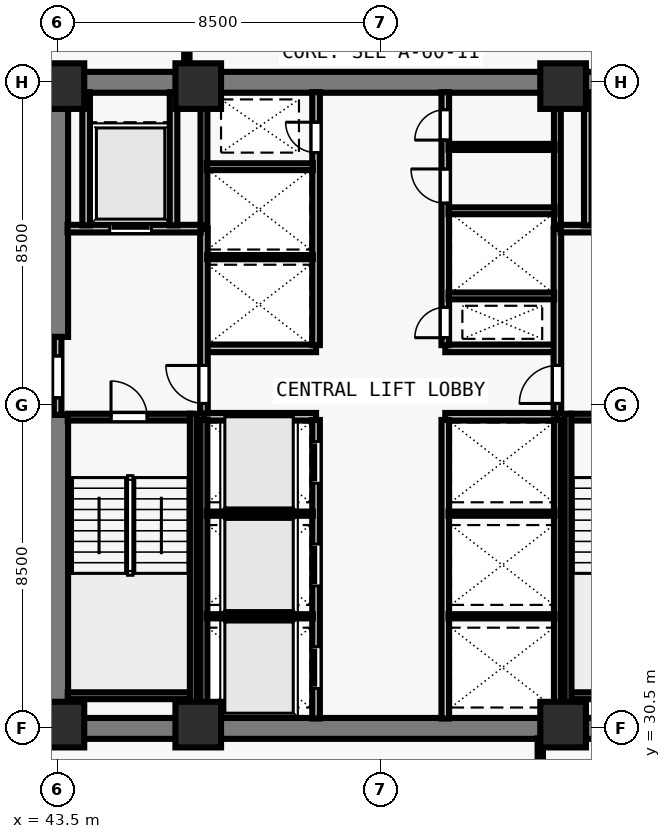
"""IFC4 building model, lengths in metres.
Left out: names, types, materials, properties, quantities, classifications, styles, units other than length and angle.
Written with IfcOpenShell. Run it as: python <this file> out.ifc"""

import sys

from ifc_helpers import new_model, si_unit, direction, frame, frame_2d, origin, origin_2d, place, context, subcontext, project, spatial, rectangle, extrude, element, fill, save


model = new_model("IFC4")
c1 = context("Model", 3, precision=1e-05, world=origin(), true_north=direction((0.0, 1.0)))
c2 = subcontext(c1, "Body", "Model", "MODEL_VIEW")
j1 = project(units=[si_unit("LENGTHUNIT", "METRE"), si_unit("PLANEANGLEUNIT", "RADIAN")], contexts=[c1])
p1 = place(None, origin())
s1 = spatial("IfcSite", under=j1, at=p1, CompositionType="ELEMENT")
p2 = place(p1, origin())
s2 = spatial("IfcBuilding", under=s1, at=p2, CompositionType="ELEMENT")
p3 = place(p2, frame((0.0, 0.0, 34.0)))
s3 = spatial("IfcBuildingStorey", under=s2, at=p3, CompositionType="ELEMENT", Elevation=34.0)
for number, where, z_axis, x_axis in (
    (1, (43.6, 30.6, 0.0), (0.0, 0.0, 1.0), (1.0, 0.0, 0.0)),
    (2, (47.2, 30.6, 0.0), (0.0, 0.0, 1.0), (1.0, 0.0, 0.0)),
    (3, (56.8, 30.6, 0.0), (0.0, 0.0, 1.0), (1.0, 0.0, 0.0)),
    (4, (43.6, 47.4, 0.0), (0.0, 0.0, 1.0), (1.0, 0.0, 0.0)),
    (5, (47.2, 47.4, 0.0), (0.0, 0.0, 1.0), (1.0, 0.0, 0.0)),
    (6, (56.8, 47.4, 0.0), (0.0, 0.0, 1.0), (1.0, 0.0, 0.0)),
):
    element("IfcColumn", number, at=place(p3, frame(where, z_axis=z_axis, x_axis=x_axis)), inside=s3, PredefinedType="COLUMN", context=c2, shape_type="SweptSolid", body=[
        extrude(rectangle(XDim=1.2, YDim=1.2, at=origin_2d()), origin(), (0.0, 0.0, 1.0), 3.5),
    ])
for number, where, z_axis, x_axis in (
    (7, (43.225, 30.5, 0.0), (0.0, 0.0, 1.0), (1.0, 0.0, 0.0)),
    (8, (43.225, 47.5, 0.0), (0.0, 0.0, 1.0), (1.0, 0.0, 0.0)),
):
    element("IfcWall", number, at=place(p3, frame(where, z_axis=z_axis, x_axis=x_axis)), inside=s3, PredefinedType="SHEAR", context=c2, shape_type="SweptSolid", body=[
        extrude(rectangle(XDim=17.55, YDim=0.55, at=frame_2d((8.775, 0.0))), origin(), (0.0, 0.0, 1.0), 3.28),
    ])
p4 = place(p3, frame((43.5, 30.765, 0.0), z_axis=(0.0, 0.0, 1.0), x_axis=(0.0, 1.0, 0.0)))
e9 = element("IfcWall", 9, at=p4, inside=s3, PredefinedType="SHEAR", context=c2, shape_type="SweptSolid", body=[
    extrude(rectangle(XDim=7.985, YDim=0.55, at=frame_2d((3.993, 0.0))), origin(), (0.0, 0.0, 1.0), 3.28),
])
p5 = place(p3, frame((43.5, 40.8, 0.0), z_axis=(0.0, 0.0, 1.0), x_axis=(0.0, 1.0, 0.0)))
e10 = element("IfcWall", 10, at=p5, inside=s3, PredefinedType="SHEAR", context=c2, shape_type="SweptSolid", body=[
    extrude(rectangle(XDim=6.435, YDim=0.55, at=frame_2d((3.218, 0.0))), origin(), (0.0, 0.0, 1.0), 3.28),
])
for number, where, z_axis, x_axis in (
    (11, (47.35, 38.7, 0.0), (0.0, 0.0, 1.0), (1.0, 0.0, 0.0)),
    (12, (47.35, 40.5, 0.0), (0.0, 0.0, 1.0), (1.0, 0.0, 0.0)),
    (13, (53.7, 38.7, 0.0), (0.0, 0.0, 1.0), (1.0, 0.0, 0.0)),
    (14, (53.7, 40.5, 0.0), (0.0, 0.0, 1.0), (1.0, 0.0, 0.0)),
):
    element("IfcWall", number, at=place(p3, frame(where, z_axis=z_axis, x_axis=x_axis)), inside=s3, PredefinedType="SOLIDWALL", context=c2, shape_type="SweptSolid", body=[
        extrude(rectangle(XDim=2.95, YDim=0.2, at=frame_2d((1.475, 0.0))), origin(), (0.0, 0.0, 1.0), 3.28),
    ])
p6 = place(p3, frame((50.3, 30.76, 0.0), z_axis=(0.0, 0.0, 1.0), x_axis=(0.0, 1.0, 0.0)))
e15 = element("IfcWall", 15, at=p6, inside=s3, PredefinedType="SOLIDWALL", context=c2, shape_type="SweptSolid", body=[
    extrude(rectangle(XDim=7.855, YDim=0.2, at=frame_2d((3.927, 0.0))), origin(), (0.0, 0.0, 1.0), 3.28),
])
p7 = place(p6, frame((0.79, 0.0, 0.0)))
e16 = element("IfcOpeningElement", 16, at=p7, cuts=e15, PredefinedType="OPENING", context=c2, shape_type="SweptSolid", body=[
    extrude(rectangle(XDim=1.1, YDim=2.2, at=frame_2d((0.55, 1.1))), frame((0.0, 0.11, 0.0), z_axis=(0.0, -1.0, 0.0), x_axis=(1.0, 0.0, 0.0)), (0.0, 0.0, 1.0), 0.22),
])
p8 = place(p6, frame((3.49, 0.0, 0.0)))
e17 = element("IfcOpeningElement", 17, at=p8, cuts=e15, PredefinedType="OPENING", context=c2, shape_type="SweptSolid", body=[
    extrude(rectangle(XDim=1.1, YDim=2.2, at=frame_2d((0.55, 1.1))), frame((0.0, 0.11, 0.0), z_axis=(0.0, -1.0, 0.0), x_axis=(1.0, 0.0, 0.0)), (0.0, 0.0, 1.0), 0.22),
])
p9 = place(p6, frame((6.19, 0.0, 0.0)))
e18 = element("IfcOpeningElement", 18, at=p9, cuts=e15, PredefinedType="OPENING", context=c2, shape_type="SweptSolid", body=[
    extrude(rectangle(XDim=1.1, YDim=2.2, at=frame_2d((0.55, 1.1))), frame((0.0, 0.11, 0.0), z_axis=(0.0, -1.0, 0.0), x_axis=(1.0, 0.0, 0.0)), (0.0, 0.0, 1.0), 0.22),
])
p10 = place(p3, frame((53.7, 30.76, 0.0), z_axis=(0.0, 0.0, 1.0), x_axis=(0.0, 1.0, 0.0)))
e19 = element("IfcWall", 19, at=p10, inside=s3, PredefinedType="SOLIDWALL", context=c2, shape_type="SweptSolid", body=[
    extrude(rectangle(XDim=7.855, YDim=0.2, at=frame_2d((3.927, 0.0))), origin(), (0.0, 0.0, 1.0), 3.28),
])
p11 = place(p3, frame((50.3, 40.585, 0.0), z_axis=(0.0, 0.0, 1.0), x_axis=(0.0, 1.0, 0.0)))
e20 = element("IfcWall", 20, at=p11, inside=s3, PredefinedType="SOLIDWALL", context=c2, shape_type="SweptSolid", body=[
    extrude(rectangle(XDim=6.655, YDim=0.2, at=frame_2d((3.328, 0.0))), origin(), (0.0, 0.0, 1.0), 3.28),
])
p12 = place(p11, frame((5.065, 0.0, 0.0)))
e21 = element("IfcOpeningElement", 21, at=p12, cuts=e20, PredefinedType="OPENING", context=c2, shape_type="SweptSolid", body=[
    extrude(rectangle(XDim=0.8, YDim=2.08, at=frame_2d((0.4, 1.04))), frame((0.0, 0.11, 0.0), z_axis=(0.0, -1.0, 0.0), x_axis=(1.0, 0.0, 0.0)), (0.0, 0.0, 1.0), 0.22),
])
p13 = place(p3, frame((53.7, 40.585, 0.0), z_axis=(0.0, 0.0, 1.0), x_axis=(0.0, 1.0, 0.0)))
e22 = element("IfcWall", 22, at=p13, inside=s3, PredefinedType="SOLIDWALL", context=c2, shape_type="SweptSolid", body=[
    extrude(rectangle(XDim=6.655, YDim=0.2, at=frame_2d((3.328, 0.0))), origin(), (0.0, 0.0, 1.0), 3.28),
])
p14 = place(p13, frame((0.195, 0.0, 0.0)))
e23 = element("IfcOpeningElement", 23, at=p14, cuts=e22, PredefinedType="OPENING", context=c2, shape_type="SweptSolid", body=[
    extrude(rectangle(XDim=0.8, YDim=2.08, at=frame_2d((0.4, 1.04))), frame((0.0, 0.11, 0.0), z_axis=(0.0, -1.0, 0.0), x_axis=(1.0, 0.0, 0.0)), (0.0, 0.0, 1.0), 0.22),
])
p15 = place(p13, frame((3.735, 0.0, 0.0)))
e24 = element("IfcOpeningElement", 24, at=p15, cuts=e22, PredefinedType="OPENING", context=c2, shape_type="SweptSolid", body=[
    extrude(rectangle(XDim=0.9, YDim=2.12, at=frame_2d((0.45, 1.06))), frame((0.0, 0.11, 0.0), z_axis=(0.0, -1.0, 0.0), x_axis=(1.0, 0.0, 0.0)), (0.0, 0.0, 1.0), 0.22),
])
p16 = place(p13, frame((5.395, 0.0, 0.0)))
e25 = element("IfcOpeningElement", 25, at=p16, cuts=e22, PredefinedType="OPENING", context=c2, shape_type="SweptSolid", body=[
    extrude(rectangle(XDim=0.8, YDim=2.1, at=frame_2d((0.4, 1.05))), frame((0.0, 0.11, 0.0), z_axis=(0.0, -1.0, 0.0), x_axis=(1.0, 0.0, 0.0)), (0.0, 0.0, 1.0), 0.22),
])
p17 = place(p3, frame((43.5, 38.75, 0.0), z_axis=(0.0, 0.0, 1.0), x_axis=(0.0, 1.0, 0.0)))
e26 = element("IfcWall", 26, at=p17, inside=s3, PredefinedType="SOLIDWALL", context=c2, shape_type="SweptSolid", body=[
    extrude(rectangle(XDim=2.05, YDim=0.2, at=frame_2d((1.025, 0.0))), origin(), (0.0, 0.0, 1.0), 3.28),
])
p18 = place(p17, frame((0.45, 0.0, 0.0)))
e27 = element("IfcOpeningElement", 27, at=p18, cuts=e26, PredefinedType="OPENING", context=c2, shape_type="SweptSolid", body=[
    extrude(rectangle(XDim=1.1, YDim=2.15, at=frame_2d((0.55, 1.075))), frame((0.0, 0.11, 0.0), z_axis=(0.0, -1.0, 0.0), x_axis=(1.0, 0.0, 0.0)), (0.0, 0.0, 1.0), 0.22),
])
p19 = place(p3, frame((47.35, 38.785, 0.0), z_axis=(0.0, 0.0, 1.0), x_axis=(0.0, 1.0, 0.0)))
e28 = element("IfcWall", 28, at=p19, inside=s3, PredefinedType="SOLIDWALL", context=c2, shape_type="SweptSolid", body=[
    extrude(rectangle(XDim=4.865, YDim=0.2, at=frame_2d((2.433, 0.0))), origin(), (0.0, 0.0, 1.0), 3.28),
])
p20 = place(p19, frame((0.265, 0.0, 0.0)))
e29 = element("IfcOpeningElement", 29, at=p20, cuts=e28, PredefinedType="OPENING", context=c2, shape_type="SweptSolid", body=[
    extrude(rectangle(XDim=1.0, YDim=2.15, at=frame_2d((0.5, 1.075))), frame((0.0, 0.11, 0.0), z_axis=(0.0, -1.0, 0.0), x_axis=(1.0, 0.0, 0.0)), (0.0, 0.0, 1.0), 0.22),
])
p21 = place(p3, frame((43.76, 43.65, 0.0), z_axis=(0.0, 0.0, 1.0), x_axis=(1.0, 0.0, 0.0)))
e30 = element("IfcWall", 30, at=p21, inside=s3, PredefinedType="SOLIDWALL", context=c2, shape_type="SweptSolid", body=[
    extrude(rectangle(XDim=3.505, YDim=0.2, at=frame_2d((1.752, 0.0))), origin(), (0.0, 0.0, 1.0), 3.28),
])
p22 = place(p21, frame((1.11, 0.0, 0.0)))
e31 = element("IfcOpeningElement", 31, at=p22, cuts=e30, PredefinedType="OPENING", context=c2, shape_type="SweptSolid", body=[
    extrude(rectangle(XDim=1.1, YDim=2.2, at=frame_2d((0.55, 1.1))), frame((0.0, 0.11, 0.0), z_axis=(0.0, -1.0, 0.0), x_axis=(1.0, 0.0, 0.0)), (0.0, 0.0, 1.0), 0.22),
])
for number, where, z_axis, x_axis in (
    (32, (46.55, 43.735, 0.0), (0.0, 0.0, 1.0), (0.0, 1.0, 0.0)),
    (33, (44.25, 43.735, 0.0), (0.0, 0.0, 1.0), (0.0, 1.0, 0.0)),
):
    element("IfcWall", number, at=place(p3, frame(where, z_axis=z_axis, x_axis=x_axis)), inside=s3, PredefinedType="SOLIDWALL", context=c2, shape_type="SweptSolid", body=[
        extrude(rectangle(XDim=3.505, YDim=0.2, at=frame_2d((1.752, 0.0))), origin(), (0.0, 0.0, 1.0), 3.28),
    ])
p23 = place(p3, frame((56.65, 38.785, 0.0), z_axis=(0.0, 0.0, 1.0), x_axis=(0.0, 1.0, 0.0)))
e34 = element("IfcWall", 34, at=p23, inside=s3, PredefinedType="SOLIDWALL", context=c2, shape_type="SweptSolid", body=[
    extrude(rectangle(XDim=4.865, YDim=0.2, at=frame_2d((2.433, 0.0))), origin(), (0.0, 0.0, 1.0), 3.28),
])
p24 = place(p23, frame((0.265, 0.0, 0.0)))
e35 = element("IfcOpeningElement", 35, at=p24, cuts=e34, PredefinedType="OPENING", context=c2, shape_type="SweptSolid", body=[
    extrude(rectangle(XDim=1.0, YDim=2.15, at=frame_2d((0.5, 1.075))), frame((0.0, 0.11, 0.0), z_axis=(0.0, -1.0, 0.0), x_axis=(1.0, 0.0, 0.0)), (0.0, 0.0, 1.0), 0.22),
])
p25 = place(p3, frame((56.735, 43.65, 0.0), z_axis=(0.0, 0.0, 1.0), x_axis=(1.0, 0.0, 0.0)))
e36 = element("IfcWall", 36, at=p25, inside=s3, PredefinedType="SOLIDWALL", context=c2, shape_type="SweptSolid", body=[
    extrude(rectangle(XDim=3.505, YDim=0.2, at=frame_2d((1.752, 0.0))), origin(), (0.0, 0.0, 1.0), 3.28),
])
p26 = place(p25, frame((1.295, 0.0, 0.0)))
e37 = element("IfcOpeningElement", 37, at=p26, cuts=e36, PredefinedType="OPENING", context=c2, shape_type="SweptSolid", body=[
    extrude(rectangle(XDim=1.1, YDim=2.2, at=frame_2d((0.55, 1.1))), frame((0.0, 0.11, 0.0), z_axis=(0.0, -1.0, 0.0), x_axis=(1.0, 0.0, 0.0)), (0.0, 0.0, 1.0), 0.22),
])
p27 = place(p3, frame((57.45, 43.735, 0.0), z_axis=(0.0, 0.0, 1.0), x_axis=(0.0, 1.0, 0.0)))
e38 = element("IfcWall", 38, at=p27, inside=s3, PredefinedType="SOLIDWALL", context=c2, shape_type="SweptSolid", body=[
    extrude(rectangle(XDim=3.505, YDim=0.2, at=frame_2d((1.752, 0.0))), origin(), (0.0, 0.0, 1.0), 3.28),
])
p28 = place(p3, frame((47.35, 30.76, 0.0), z_axis=(0.0, 0.0, 1.0), x_axis=(0.0, 1.0, 0.0)))
e39 = element("IfcWall", 39, at=p28, inside=s3, PredefinedType="SOLIDWALL", context=c2, shape_type="SweptSolid", body=[
    extrude(rectangle(XDim=7.855, YDim=0.18, at=frame_2d((3.927, 0.0))), origin(), (0.0, 0.0, 1.0), 3.28),
])
for number, where, z_axis, x_axis in (
    (40, (47.425, 33.45, 0.0), (0.0, 0.0, 1.0), (1.0, 0.0, 0.0)),
    (41, (47.425, 36.15, 0.0), (0.0, 0.0, 1.0), (1.0, 0.0, 0.0)),
):
    element("IfcWall", number, at=place(p3, frame(where, z_axis=z_axis, x_axis=x_axis)), inside=s3, PredefinedType="PARTITIONING", context=c2, shape_type="SweptSolid", body=[
        extrude(rectangle(XDim=2.79, YDim=0.11, at=frame_2d((1.395, 0.0))), origin(), (0.0, 0.0, 1.0), 3.28),
    ])
p29 = place(p3, frame((56.65, 30.76, 0.0), z_axis=(0.0, 0.0, 1.0), x_axis=(0.0, 1.0, 0.0)))
e42 = element("IfcWall", 42, at=p29, inside=s3, PredefinedType="SOLIDWALL", context=c2, shape_type="SweptSolid", body=[
    extrude(rectangle(XDim=7.855, YDim=0.18, at=frame_2d((3.927, 0.0))), origin(), (0.0, 0.0, 1.0), 3.28),
])
for number, where, z_axis, x_axis in (
    (43, (53.785, 33.45, 0.0), (0.0, 0.0, 1.0), (1.0, 0.0, 0.0)),
    (44, (53.785, 36.15, 0.0), (0.0, 0.0, 1.0), (1.0, 0.0, 0.0)),
):
    element("IfcWall", number, at=place(p3, frame(where, z_axis=z_axis, x_axis=x_axis)), inside=s3, PredefinedType="PARTITIONING", context=c2, shape_type="SweptSolid", body=[
        extrude(rectangle(XDim=2.79, YDim=0.11, at=frame_2d((1.395, 0.0))), origin(), (0.0, 0.0, 1.0), 3.28),
    ])
p30 = place(p3, frame((47.35, 43.735, 0.0), z_axis=(0.0, 0.0, 1.0), x_axis=(0.0, 1.0, 0.0)))
e45 = element("IfcWall", 45, at=p30, inside=s3, PredefinedType="SOLIDWALL", context=c2, shape_type="SweptSolid", body=[
    extrude(rectangle(XDim=3.505, YDim=0.18, at=frame_2d((1.752, 0.0))), origin(), (0.0, 0.0, 1.0), 3.28),
])
p31 = place(p3, frame((47.435, 42.9, 0.0), z_axis=(0.0, 0.0, 1.0), x_axis=(1.0, 0.0, 0.0)))
e46 = element("IfcWall", 46, at=p31, inside=s3, PredefinedType="PARTITIONING", context=c2, shape_type="SweptSolid", body=[
    extrude(rectangle(XDim=2.78, YDim=0.11, at=frame_2d((1.39, 0.0))), origin(), (0.0, 0.0, 1.0), 3.28),
])
p32 = place(p3, frame((47.425, 45.28, 0.0), z_axis=(0.0, 0.0, 1.0), x_axis=(1.0, 0.0, 0.0)))
e47 = element("IfcWall", 47, at=p32, inside=s3, PredefinedType="SOLIDWALL", context=c2, shape_type="SweptSolid", body=[
    extrude(rectangle(XDim=2.79, YDim=0.18, at=frame_2d((1.395, 0.0))), origin(), (0.0, 0.0, 1.0), 3.28),
])
p33 = place(p3, frame((56.65, 43.735, 0.0), z_axis=(0.0, 0.0, 1.0), x_axis=(0.0, 1.0, 0.0)))
e48 = element("IfcWall", 48, at=p33, inside=s3, PredefinedType="SOLIDWALL", context=c2, shape_type="SweptSolid", body=[
    extrude(rectangle(XDim=3.505, YDim=0.18, at=frame_2d((1.752, 0.0))), origin(), (0.0, 0.0, 1.0), 3.28),
])
p34 = place(p3, frame((53.785, 41.88, 0.0), z_axis=(0.0, 0.0, 1.0), x_axis=(1.0, 0.0, 0.0)))
e49 = element("IfcWall", 49, at=p34, inside=s3, PredefinedType="SOLIDWALL", context=c2, shape_type="SweptSolid", body=[
    extrude(rectangle(XDim=2.78, YDim=0.18, at=frame_2d((1.39, 0.0))), origin(), (0.0, 0.0, 1.0), 3.28),
])
p35 = place(p3, frame((53.785, 44.12, 0.0), z_axis=(0.0, 0.0, 1.0), x_axis=(1.0, 0.0, 0.0)))
e50 = element("IfcWall", 50, at=p35, inside=s3, PredefinedType="SOLIDWALL", context=c2, shape_type="SweptSolid", body=[
    extrude(rectangle(XDim=2.79, YDim=0.18, at=frame_2d((1.395, 0.0))), origin(), (0.0, 0.0, 1.0), 3.28),
])
p36 = place(p3, frame((53.785, 45.8, 0.0), z_axis=(0.0, 0.0, 1.0), x_axis=(1.0, 0.0, 0.0)))
e51 = element("IfcWall", 51, at=p36, inside=s3, PredefinedType="PARTITIONING", context=c2, shape_type="SweptSolid", body=[
    extrude(rectangle(XDim=2.79, YDim=0.16, at=frame_2d((1.395, 0.0))), origin(), (0.0, 0.0, 1.0), 3.28),
])
p37 = place(p3, frame((56.2, 24.605, 0.0), z_axis=(0.0, 0.0, 1.0), x_axis=(0.0, 1.0, 0.0)))
e52 = element("IfcWall", 52, at=p37, inside=s3, PredefinedType="PARTITIONING", context=c2, shape_type="SweptSolid", body=[
    extrude(rectangle(XDim=5.635, YDim=0.14, at=frame_2d((2.817, 0.0))), origin(), (0.0, 0.0, 1.0), 2.849),
])
p38 = place(p3, frame((46.9, 47.76, 0.0), z_axis=(0.0, 0.0, 1.0), x_axis=(0.0, 1.0, 0.0)))
e53 = element("IfcWall", 53, at=p38, inside=s3, PredefinedType="PARTITIONING", context=c2, shape_type="SweptSolid", body=[
    extrude(rectangle(XDim=5.635, YDim=0.14, at=frame_2d((2.817, 0.0))), origin(), (0.0, 0.0, 1.0), 3.28),
])
p39 = place(p3, frame((43.765, 38.69, 0.0), z_axis=(0.0, 0.0, 1.0), x_axis=(1.0, 0.0, 0.0)))
e54 = element("IfcWall", 54, at=p39, inside=s3, PredefinedType="SOLIDWALL", context=c2, shape_type="SweptSolid", body=[
    extrude(rectangle(XDim=3.23, YDim=0.18, at=frame_2d((1.615, 0.0))), origin(), (0.0, 0.0, 1.0), 3.28),
])
p40 = place(p39, frame((1.14, 0.0, 0.0)))
e55 = element("IfcOpeningElement", 55, at=p40, cuts=e54, PredefinedType="OPENING", context=c2, shape_type="SweptSolid", body=[
    extrude(rectangle(XDim=0.95, YDim=2.15, at=frame_2d((0.475, 1.075))), frame((0.0, 0.1, 0.0), z_axis=(0.0, -1.0, 0.0), x_axis=(1.0, 0.0, 0.0)), (0.0, 0.0, 1.0), 0.2),
])
p41 = place(p3, frame((43.765, 31.36, 0.0), z_axis=(0.0, 0.0, 1.0), x_axis=(1.0, 0.0, 0.0)))
e56 = element("IfcWall", 56, at=p41, inside=s3, PredefinedType="SOLIDWALL", context=c2, shape_type="SweptSolid", body=[
    extrude(rectangle(XDim=3.23, YDim=0.18, at=frame_2d((1.615, 0.0))), origin(), (0.0, 0.0, 1.0), 3.28),
])
p42 = place(p3, frame((47.07, 38.78, 0.0), z_axis=(0.0, 0.0, 1.0), x_axis=(0.0, -1.0, 0.0)))
e57 = element("IfcWall", 57, at=p42, inside=s3, PredefinedType="SOLIDWALL", context=c2, shape_type="SweptSolid", body=[
    extrude(rectangle(XDim=8.017, YDim=0.18, at=frame_2d((4.009, 0.0))), origin(), (0.0, 0.0, 1.0), 3.28),
])
p43 = place(p3, frame((57.005, 38.69, 0.0), z_axis=(0.0, 0.0, 1.0), x_axis=(1.0, 0.0, 0.0)))
e58 = element("IfcWall", 58, at=p43, inside=s3, PredefinedType="SOLIDWALL", context=c2, shape_type="SweptSolid", body=[
    extrude(rectangle(XDim=3.23, YDim=0.18, at=frame_2d((1.615, 0.0))), origin(), (0.0, 0.0, 1.0), 3.28),
])
p44 = place(p43, frame((1.14, 0.0, 0.0)))
e59 = element("IfcOpeningElement", 59, at=p44, cuts=e58, PredefinedType="OPENING", context=c2, shape_type="SweptSolid", body=[
    extrude(rectangle(XDim=0.95, YDim=2.15, at=frame_2d((0.475, 1.075))), frame((0.0, 0.1, 0.0), z_axis=(0.0, -1.0, 0.0), x_axis=(1.0, 0.0, 0.0)), (0.0, 0.0, 1.0), 0.2),
])
p45 = place(p3, frame((57.005, 31.36, 0.0), z_axis=(0.0, 0.0, 1.0), x_axis=(1.0, 0.0, 0.0)))
e60 = element("IfcWall", 60, at=p45, inside=s3, PredefinedType="SOLIDWALL", context=c2, shape_type="SweptSolid", body=[
    extrude(rectangle(XDim=3.23, YDim=0.18, at=frame_2d((1.615, 0.0))), origin(), (0.0, 0.0, 1.0), 3.28),
])
p46 = place(p3, frame((56.93, 38.78, 0.0), z_axis=(0.0, 0.0, 1.0), x_axis=(0.0, -1.0, 0.0)))
e61 = element("IfcWall", 61, at=p46, inside=s3, PredefinedType="SOLIDWALL", context=c2, shape_type="SweptSolid", body=[
    extrude(rectangle(XDim=8.017, YDim=0.18, at=frame_2d((4.009, 0.0))), origin(), (0.0, 0.0, 1.0), 3.28),
])
p47 = place(p18, origin())
e62 = element("IfcDoor", 62, at=p47, inside=s3, OperationType="SINGLE_SWING_LEFT", PredefinedType="DOOR", context=c2, shape_type="SweptSolid", body=[
    extrude(rectangle(XDim=1.1, YDim=2.15, at=frame_2d((0.55, 1.075))), frame((0.0, 0.025, 0.0), z_axis=(0.0, -1.0, 0.0), x_axis=(1.0, 0.0, 0.0)), (0.0, 0.0, 1.0), 0.05),
])
fill(e27, e62)
p48 = place(p20, origin())
e63 = element("IfcDoor", 63, at=p48, inside=s3, OperationType="SINGLE_SWING_RIGHT", PredefinedType="DOOR", context=c2, shape_type="SweptSolid", body=[
    extrude(rectangle(XDim=1.0, YDim=2.15, at=frame_2d((0.5, 1.075))), frame((0.0, 0.025, 0.0), z_axis=(0.0, -1.0, 0.0), x_axis=(1.0, 0.0, 0.0)), (0.0, 0.0, 1.0), 0.05),
])
fill(e29, e63)
p49 = place(p22, origin())
e64 = element("IfcDoor", 64, at=p49, inside=s3, OperationType="SLIDING_TO_LEFT", PredefinedType="DOOR", context=c2, shape_type="SweptSolid", body=[
    extrude(rectangle(XDim=1.1, YDim=2.2, at=frame_2d((0.55, 1.1))), frame((0.0, 0.025, 0.0), z_axis=(0.0, -1.0, 0.0), x_axis=(1.0, 0.0, 0.0)), (0.0, 0.0, 1.0), 0.05),
])
fill(e31, e64)
p50 = place(p24, origin())
e65 = element("IfcDoor", 65, at=p50, inside=s3, OperationType="SINGLE_SWING_LEFT", PredefinedType="DOOR", context=c2, shape_type="SweptSolid", body=[
    extrude(rectangle(XDim=1.0, YDim=2.15, at=frame_2d((0.5, 1.075))), frame((0.0, 0.025, 0.0), z_axis=(0.0, -1.0, 0.0), x_axis=(1.0, 0.0, 0.0)), (0.0, 0.0, 1.0), 0.05),
])
fill(e35, e65)
p51 = place(p7, origin())
e66 = element("IfcDoor", 66, at=p51, inside=s3, OperationType="SLIDING_TO_LEFT", PredefinedType="DOOR", context=c2, shape_type="SweptSolid", body=[
    extrude(rectangle(XDim=1.1, YDim=2.2, at=frame_2d((0.55, 1.1))), frame((0.0, 0.025, 0.0), z_axis=(0.0, -1.0, 0.0), x_axis=(1.0, 0.0, 0.0)), (0.0, 0.0, 1.0), 0.05),
])
fill(e16, e66)
p52 = place(p8, origin())
e67 = element("IfcDoor", 67, at=p52, inside=s3, OperationType="SLIDING_TO_LEFT", PredefinedType="DOOR", context=c2, shape_type="SweptSolid", body=[
    extrude(rectangle(XDim=1.1, YDim=2.2, at=frame_2d((0.55, 1.1))), frame((0.0, 0.025, 0.0), z_axis=(0.0, -1.0, 0.0), x_axis=(1.0, 0.0, 0.0)), (0.0, 0.0, 1.0), 0.05),
])
fill(e17, e67)
p53 = place(p9, origin())
e68 = element("IfcDoor", 68, at=p53, inside=s3, OperationType="SLIDING_TO_LEFT", PredefinedType="DOOR", context=c2, shape_type="SweptSolid", body=[
    extrude(rectangle(XDim=1.1, YDim=2.2, at=frame_2d((0.55, 1.1))), frame((0.0, 0.025, 0.0), z_axis=(0.0, -1.0, 0.0), x_axis=(1.0, 0.0, 0.0)), (0.0, 0.0, 1.0), 0.05),
])
fill(e18, e68)
p54 = place(p12, origin())
e69 = element("IfcDoor", 69, at=p54, inside=s3, OperationType="SINGLE_SWING_RIGHT", PredefinedType="DOOR", context=c2, shape_type="SweptSolid", body=[
    extrude(rectangle(XDim=0.8, YDim=2.08, at=frame_2d((0.4, 1.04))), frame((0.0, 0.025, 0.0), z_axis=(0.0, -1.0, 0.0), x_axis=(1.0, 0.0, 0.0)), (0.0, 0.0, 1.0), 0.05),
])
fill(e21, e69)
p55 = place(p14, origin())
e70 = element("IfcDoor", 70, at=p55, inside=s3, OperationType="SINGLE_SWING_LEFT", PredefinedType="DOOR", context=c2, shape_type="SweptSolid", body=[
    extrude(rectangle(XDim=0.8, YDim=2.08, at=frame_2d((0.4, 1.04))), frame((0.0, 0.025, 0.0), z_axis=(0.0, -1.0, 0.0), x_axis=(1.0, 0.0, 0.0)), (0.0, 0.0, 1.0), 0.05),
])
fill(e23, e70)
p56 = place(p15, origin())
e71 = element("IfcDoor", 71, at=p56, inside=s3, OperationType="SINGLE_SWING_RIGHT", PredefinedType="DOOR", context=c2, shape_type="SweptSolid", body=[
    extrude(rectangle(XDim=0.9, YDim=2.12, at=frame_2d((0.45, 1.06))), frame((0.0, 0.025, 0.0), z_axis=(0.0, -1.0, 0.0), x_axis=(1.0, 0.0, 0.0)), (0.0, 0.0, 1.0), 0.05),
])
fill(e24, e71)
p57 = place(p16, origin())
e72 = element("IfcDoor", 72, at=p57, inside=s3, OperationType="SINGLE_SWING_LEFT", PredefinedType="DOOR", context=c2, shape_type="SweptSolid", body=[
    extrude(rectangle(XDim=0.8, YDim=2.1, at=frame_2d((0.4, 1.05))), frame((0.0, 0.025, 0.0), z_axis=(0.0, -1.0, 0.0), x_axis=(1.0, 0.0, 0.0)), (0.0, 0.0, 1.0), 0.05),
])
fill(e25, e72)
p58 = place(p40, origin())
e73 = element("IfcDoor", 73, at=p58, inside=s3, OperationType="SINGLE_SWING_LEFT", PredefinedType="DOOR", context=c2, shape_type="SweptSolid", body=[
    extrude(rectangle(XDim=0.95, YDim=2.15, at=frame_2d((0.475, 1.075))), frame((0.0, 0.025, 0.0), z_axis=(0.0, -1.0, 0.0), x_axis=(1.0, 0.0, 0.0)), (0.0, 0.0, 1.0), 0.05),
])
fill(e55, e73)
save(model, sys.argv[1])
